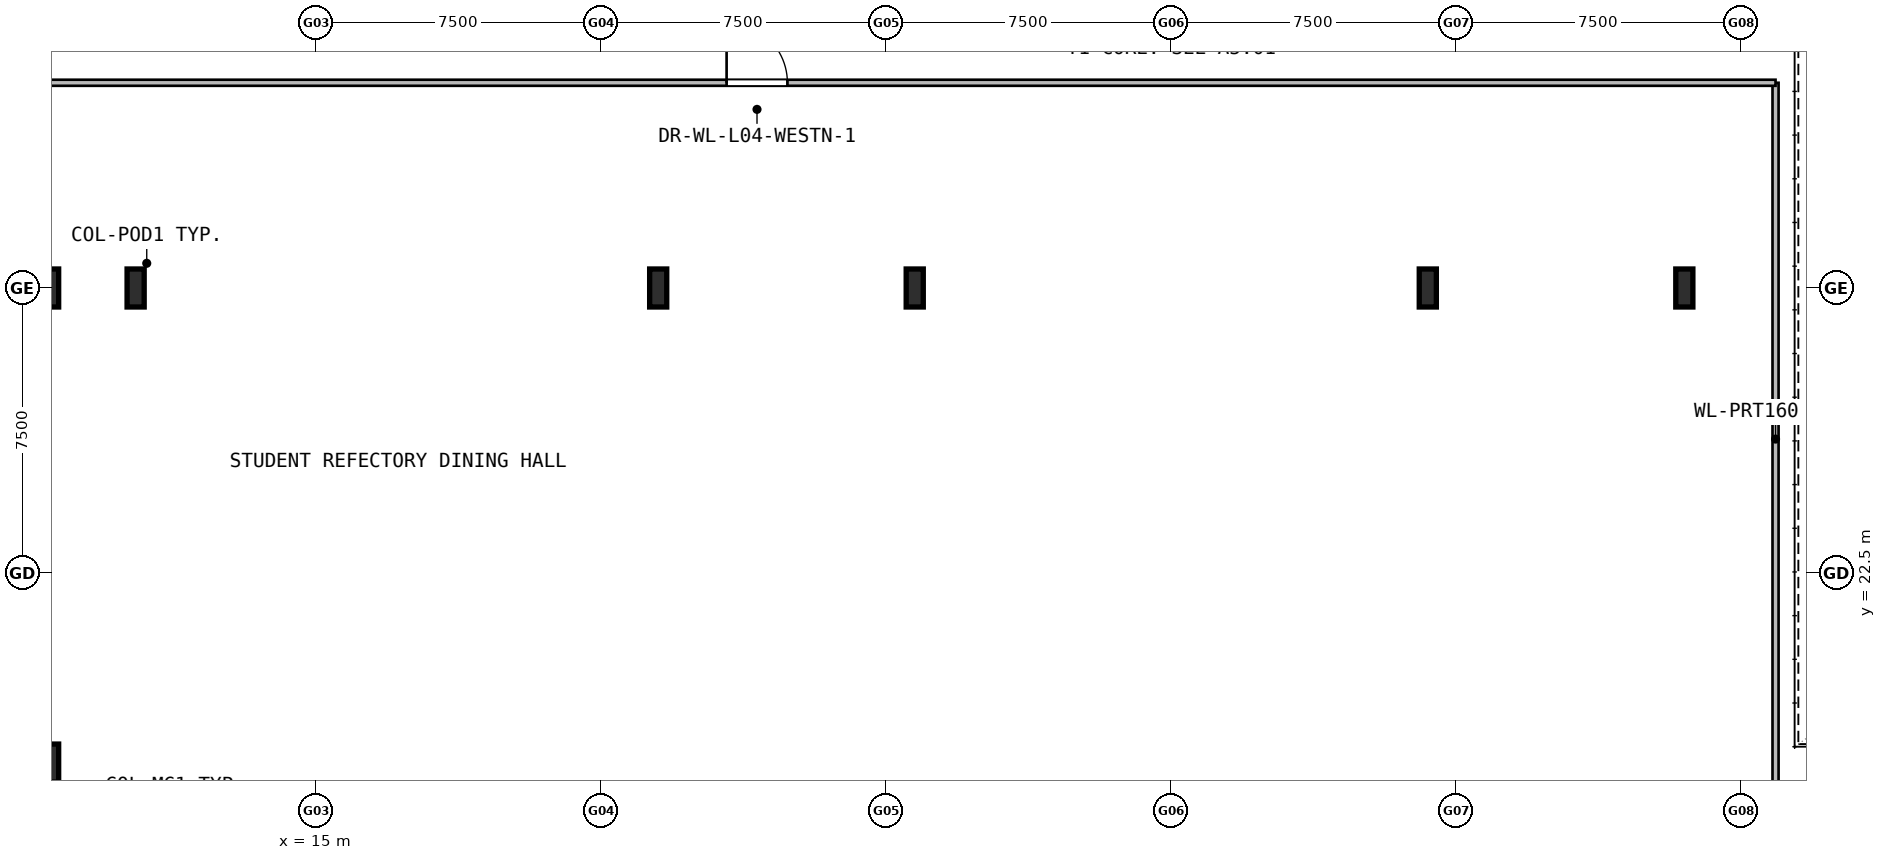
"""IFC4 building model, lengths in metres.
Left out: names, types, materials, properties, quantities, classifications, styles, units other than length and angle.
Written with IfcOpenShell. Run it as: python <this file> out.ifc"""

import sys

from ifc_helpers import new_model, si_unit, direction, frame, frame_2d, origin, origin_2d, place, context, subcontext, project, spatial, rectangle, i_section, extrude, element, fill, save


model = new_model("IFC4")
c1 = context("Model", 3, precision=1e-05, world=origin(), true_north=direction((0.0, 1.0)))
c2 = subcontext(c1, "Body", "Model", "MODEL_VIEW")
j1 = project(units=[si_unit("LENGTHUNIT", "METRE"), si_unit("PLANEANGLEUNIT", "RADIAN")], contexts=[c1])
p1 = place(None, origin())
s1 = spatial("IfcSite", under=j1, at=p1, CompositionType="ELEMENT")
p2 = place(p1, origin())
s2 = spatial("IfcBuilding", under=s1, at=p2, CompositionType="ELEMENT")
p3 = place(p2, frame((0.0, 0.0, 20.4)))
s3 = spatial("IfcBuildingStorey", under=s2, at=p3, CompositionType="ELEMENT", Elevation=20.4)
for number, where, z_axis, x_axis in (
    (1, (10.25, 30.0, 0.0), (0.0, 0.0, 1.0), (1.0, 0.0, 0.0)),
    (2, (24.0, 30.0, 0.0), (0.0, 0.0, 1.0), (1.0, 0.0, 0.0)),
    (3, (30.75, 30.0, 0.0), (0.0, 0.0, 1.0), (1.0, 0.0, 0.0)),
    (4, (44.25, 30.0, 0.0), (0.0, 0.0, 1.0), (1.0, 0.0, 0.0)),
    (5, (51.0, 30.0, 0.0), (0.0, 0.0, 1.0), (1.0, 0.0, 0.0)),
    (6, (8.0, 17.5, 0.0), (0.0, 0.0, 1.0), (1.0, 0.0, 0.0)),
    (7, (8.0, 30.0, 0.0), (0.0, 0.0, 1.0), (1.0, 0.0, 0.0)),
):
    element("IfcColumn", number, at=place(p3, frame(where, z_axis=z_axis, x_axis=x_axis)), inside=s3, PredefinedType="COLUMN", context=c2, shape_type="SweptSolid", body=[
        extrude(i_section(OverallWidth=0.45, OverallDepth=1.0, WebThickness=0.022, FlangeThickness=0.04, at=origin_2d()), origin(), (0.0, 0.0, 1.0), 4.8),
    ])
p4 = place(p3, frame((53.4, 16.65, 0.0), z_axis=(0.0, 0.0, 1.0), x_axis=(0.0, 1.0, 0.0)))
e8 = element("IfcWall", 8, at=p4, inside=s3, PredefinedType="PARTITIONING", context=c2, shape_type="SweptSolid", body=[
    extrude(rectangle(XDim=18.75, YDim=0.16, at=frame_2d((9.375, 0.0))), origin(), (0.0, 0.0, 1.0), 4.43),
])
p5 = place(p3, frame((7.65, 35.4, 0.0), z_axis=(0.0, 0.0, 1.0), x_axis=(1.0, 0.0, 0.0)))
e9 = element("IfcWall", 9, at=p5, inside=s3, PredefinedType="PARTITIONING", context=c2, shape_type="SweptSolid", body=[
    extrude(rectangle(XDim=45.75, YDim=0.16, at=frame_2d((22.875, 0.0))), origin(), (0.0, 0.0, 1.0), 4.43),
])
p6 = place(p5, frame((18.15, 0.0, 0.0)))
e10 = element("IfcOpeningElement", 10, at=p6, cuts=e9, PredefinedType="OPENING", context=c2, shape_type="SweptSolid", body=[
    extrude(rectangle(XDim=1.6, YDim=2.2, at=frame_2d((0.8, 1.1))), frame((0.0, 0.09, 0.0), z_axis=(0.0, -1.0, 0.0), x_axis=(1.0, 0.0, 0.0)), (0.0, 0.0, 1.0), 0.18),
])
p7 = place(p6, origin())
e11 = element("IfcDoor", 11, at=p7, inside=s3, OperationType="DOUBLE_DOOR_SINGLE_SWING", PredefinedType="DOOR", context=c2, shape_type="SweptSolid", body=[
    extrude(rectangle(XDim=1.6, YDim=2.2, at=frame_2d((0.8, 1.1))), frame((0.0, 0.025, 0.0), z_axis=(0.0, -1.0, 0.0), x_axis=(1.0, 0.0, 0.0)), (0.0, 0.0, 1.0), 0.05),
])
fill(e10, e11)
save(model, sys.argv[1])
